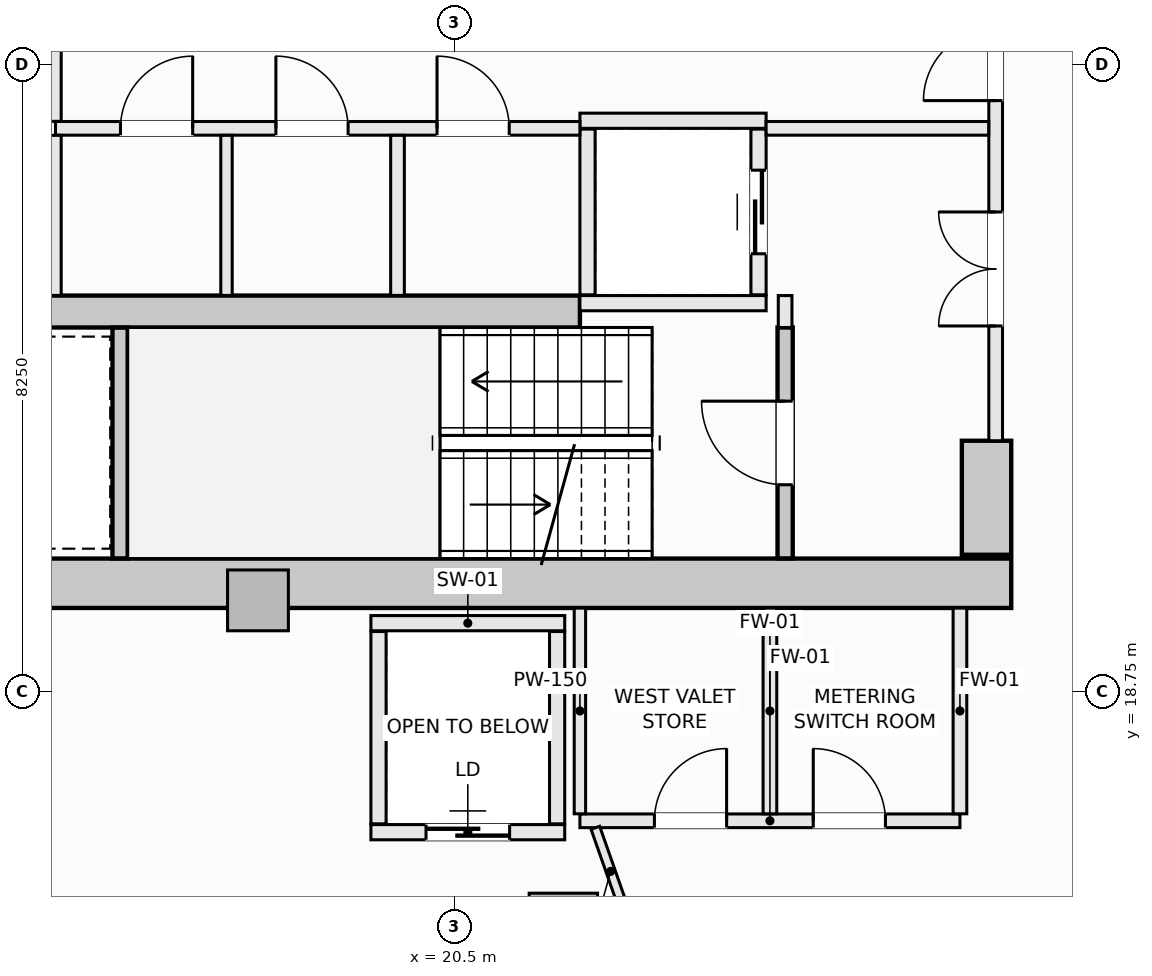
"""IFC4 building model, lengths in metres.
Left out: names, types, materials, properties, quantities, classifications, styles, units other than length and angle.
Written with IfcOpenShell. Run it as: python <this file> out.ifc"""

import sys

from ifc_helpers import new_model, si_unit, direction, frame, frame_2d, origin, origin_2d, place, context, subcontext, project, spatial, rectangle, extrude, element, fill, save


model = new_model("IFC4")
c1 = context("Model", 3, precision=1e-05, world=origin(), true_north=direction((0.0, 1.0)))
c2 = subcontext(c1, "Body", "Model", "MODEL_VIEW")
j1 = project(units=[si_unit("LENGTHUNIT", "METRE"), si_unit("PLANEANGLEUNIT", "RADIAN")], contexts=[c1])
p1 = place(None, origin())
s1 = spatial("IfcSite", under=j1, at=p1, CompositionType="ELEMENT")
p2 = place(p1, origin())
s2 = spatial("IfcBuilding", under=s1, at=p2, CompositionType="ELEMENT")
p3 = place(p2, frame((0.0, 0.0, 135.9)))
s3 = spatial("IfcBuildingStorey", under=s2, at=p3, CompositionType="ELEMENT", Elevation=135.9)
p4 = place(p3, frame((14.175, 20.175, -0.27), z_axis=(0.0, 0.0, 1.0), x_axis=(1.0, 0.0, 0.0)))
e1 = element("IfcWall", 1, at=p4, inside=s3, PredefinedType="SHEAR", context=c2, shape_type="SweptSolid", body=[
    extrude(rectangle(XDim=13.65, YDim=0.65, at=frame_2d((6.825, 0.0))), origin(), (0.0, 0.0, 1.0), 3.4),
])
p5 = place(p3, frame((27.5, 20.55, -0.27), z_axis=(0.0, 0.0, 1.0), x_axis=(0.0, 1.0, 0.0)))
e2 = element("IfcWall", 2, at=p5, inside=s3, PredefinedType="SHEAR", context=c2, shape_type="SweptSolid", body=[
    extrude(rectangle(XDim=1.5, YDim=0.65, at=frame_2d((0.75, 0.0))), origin(), (0.0, 0.0, 1.0), 3.4),
])
p6 = place(p3, frame((14.85, 23.75, -0.27), z_axis=(0.0, 0.0, 1.0), x_axis=(1.0, 0.0, 0.0)))
e3 = element("IfcWall", 3, at=p6, inside=s3, PredefinedType="SHEAR", context=c2, shape_type="SweptSolid", body=[
    extrude(rectangle(XDim=7.3, YDim=0.42, at=frame_2d((3.65, 0.0))), origin(), (0.0, 0.0, 1.0), 3.4),
])
p7 = place(p3, frame((21.932, 15.648, -0.27), z_axis=(0.0, 0.0, 1.0), x_axis=(1.0, 0.0, 0.0)))
e4 = element("IfcColumn", 4, at=p7, inside=s3, PredefinedType="COLUMN", context=c2, shape_type="SweptSolid", body=[
    extrude(rectangle(XDim=0.9, YDim=0.9, at=origin_2d()), origin(), (0.0, 0.0, 1.0), 3.4),
])
p8 = place(p3, frame((17.914, 19.95, -0.27), z_axis=(0.0, 0.0, 1.0), x_axis=(1.0, 0.0, 0.0)))
e5 = element("IfcColumn", 5, at=p8, inside=s3, PredefinedType="PILASTER", context=c2, shape_type="SweptSolid", body=[
    extrude(rectangle(XDim=0.8, YDim=0.8, at=origin_2d()), origin(), (0.0, 0.0, 1.0), 3.4),
])
p9 = place(p3, frame((24.85, 20.502, -0.27), z_axis=(0.0, 0.0, 1.0), x_axis=(0.0, 1.0, 0.0)))
e6 = element("IfcWall", 6, at=p9, inside=s3, PredefinedType="SHEAR", context=c2, shape_type="SweptSolid", body=[
    extrude(rectangle(XDim=3.038, YDim=0.2, at=frame_2d((1.519, 0.0))), origin(), (0.0, 0.0, 1.0), 3.4),
])
p10 = place(p9, frame((0.969, 0.0, 0.27)))
e7 = element("IfcOpeningElement", 7, at=p10, cuts=e6, PredefinedType="OPENING", context=c2, shape_type="SweptSolid", body=[
    extrude(rectangle(XDim=1.1, YDim=2.15, at=frame_2d((0.55, 1.075))), frame((0.0, 0.11, 0.0), z_axis=(0.0, -1.0, 0.0), x_axis=(1.0, 0.0, 0.0)), (0.0, 0.0, 1.0), 0.22),
])
p11 = place(p3, frame((16.1, 20.502, -0.27), z_axis=(0.0, 0.0, 1.0), x_axis=(0.0, 1.0, 0.0)))
e8 = element("IfcWall", 8, at=p11, inside=s3, PredefinedType="SHEAR", context=c2, shape_type="SweptSolid", body=[
    extrude(rectangle(XDim=3.036, YDim=0.2, at=frame_2d((1.518, 0.0))), origin(), (0.0, 0.0, 1.0), 3.4),
])
for number, where, z_axis, x_axis in (
    (9, (22.15, 26.26, 0.0), (0.0, 0.0, 1.0), (1.0, 0.0, 0.0)),
    (10, (22.15, 23.86, 0.0), (0.0, 0.0, 1.0), (1.0, 0.0, 0.0)),
):
    element("IfcWall", number, at=place(p3, frame(where, z_axis=z_axis, x_axis=x_axis)), inside=s3, PredefinedType="SOLIDWALL", context=c2, shape_type="SweptSolid", body=[
        extrude(rectangle(XDim=2.45, YDim=0.2, at=frame_2d((1.225, 0.0))), origin(), (0.0, 0.0, 1.0), 3.13),
    ])
p12 = place(p3, frame((22.25, 23.97, 0.0), z_axis=(0.0, 0.0, 1.0), x_axis=(0.0, 1.0, 0.0)))
e11 = element("IfcWall", 11, at=p12, inside=s3, PredefinedType="SOLIDWALL", context=c2, shape_type="SweptSolid", body=[
    extrude(rectangle(XDim=2.18, YDim=0.2, at=frame_2d((1.09, 0.0))), origin(), (0.0, 0.0, 1.0), 3.13),
])
p13 = place(p3, frame((24.5, 23.97, 0.0), z_axis=(0.0, 0.0, 1.0), x_axis=(0.0, 1.0, 0.0)))
e12 = element("IfcWall", 12, at=p13, inside=s3, PredefinedType="SOLIDWALL", context=c2, shape_type="SweptSolid", body=[
    extrude(rectangle(XDim=2.18, YDim=0.2, at=frame_2d((1.09, 0.0))), origin(), (0.0, 0.0, 1.0), 3.13),
])
p14 = place(p13, frame((0.54, 0.0, 0.0)))
e13 = element("IfcOpeningElement", 13, at=p14, cuts=e12, PredefinedType="OPENING", context=c2, shape_type="SweptSolid", body=[
    extrude(rectangle(XDim=1.1, YDim=2.2, at=frame_2d((0.55, 1.1))), frame((0.0, 0.11, 0.0), z_axis=(0.0, -1.0, 0.0), x_axis=(1.0, 0.0, 0.0)), (0.0, 0.0, 1.0), 0.22),
])
p15 = place(p3, frame((19.4, 19.65, 0.0), z_axis=(0.0, 0.0, 1.0), x_axis=(1.0, 0.0, 0.0)))
e14 = element("IfcWall", 14, at=p15, inside=s3, PredefinedType="SOLIDWALL", context=c2, shape_type="SweptSolid", body=[
    extrude(rectangle(XDim=2.55, YDim=0.2, at=frame_2d((1.275, 0.0))), origin(), (0.0, 0.0, 1.0), 3.13),
])
p16 = place(p3, frame((19.4, 16.9, 0.0), z_axis=(0.0, 0.0, 1.0), x_axis=(1.0, 0.0, 0.0)))
e15 = element("IfcWall", 15, at=p16, inside=s3, PredefinedType="SOLIDWALL", context=c2, shape_type="SweptSolid", body=[
    extrude(rectangle(XDim=2.55, YDim=0.2, at=frame_2d((1.275, 0.0))), origin(), (0.0, 0.0, 1.0), 3.13),
])
p17 = place(p16, frame((0.725, 0.0, 0.0)))
e16 = element("IfcOpeningElement", 16, at=p17, cuts=e15, PredefinedType="OPENING", context=c2, shape_type="SweptSolid", body=[
    extrude(rectangle(XDim=1.1, YDim=2.2, at=frame_2d((0.55, 1.1))), frame((0.0, 0.11, 0.0), z_axis=(0.0, -1.0, 0.0), x_axis=(1.0, 0.0, 0.0)), (0.0, 0.0, 1.0), 0.22),
])
for number, where, z_axis, x_axis in (
    (17, (19.5, 17.01, 0.0), (0.0, 0.0, 1.0), (0.0, 1.0, 0.0)),
    (18, (21.85, 17.01, 0.0), (0.0, 0.0, 1.0), (0.0, 1.0, 0.0)),
):
    element("IfcWall", number, at=place(p3, frame(where, z_axis=z_axis, x_axis=x_axis)), inside=s3, PredefinedType="SOLIDWALL", context=c2, shape_type="SweptSolid", body=[
        extrude(rectangle(XDim=2.53, YDim=0.2, at=frame_2d((1.265, 0.0))), origin(), (0.0, 0.0, 1.0), 3.13),
    ])
p18 = place(p3, frame((24.85, 23.54, 0.0), z_axis=(0.0, 0.0, 1.0), x_axis=(0.0, 1.0, 0.0)))
e19 = element("IfcWall", 19, at=p18, inside=s3, PredefinedType="SOLIDWALL", context=c2, shape_type="SweptSolid", body=[
    extrude(rectangle(XDim=0.42, YDim=0.18, at=frame_2d((0.21, 0.0))), origin(), (0.0, 0.0, 1.0), 3.13),
])
p19 = place(p3, frame((27.62, 22.05, 0.0), z_axis=(0.0, 0.0, 1.0), x_axis=(0.0, 1.0, 0.0)))
e20 = element("IfcWall", 20, at=p19, inside=s3, PredefinedType="SOLIDWALL", context=c2, shape_type="SweptSolid", body=[
    extrude(rectangle(XDim=9.9, YDim=0.18, at=frame_2d((4.95, 0.0))), origin(), (0.0, 0.0, 1.0), 3.13),
])
p20 = place(p19, frame((4.475, 0.0, 0.0)))
e21 = element("IfcOpeningElement", 21, at=p20, cuts=e20, PredefinedType="OPENING", context=c2, shape_type="SweptSolid", body=[
    extrude(rectangle(XDim=0.95, YDim=2.1, at=frame_2d((0.475, 1.05))), frame((0.0, 0.1, 0.0), z_axis=(0.0, -1.0, 0.0), x_axis=(1.0, 0.0, 0.0)), (0.0, 0.0, 1.0), 0.2),
])
p21 = place(p19, frame((6.89, 0.0, 0.0)))
e22 = element("IfcOpeningElement", 22, at=p21, cuts=e20, PredefinedType="OPENING", context=c2, shape_type="SweptSolid", body=[
    extrude(rectangle(XDim=1.5, YDim=2.2, at=frame_2d((0.75, 1.1))), frame((0.0, 0.1, 0.0), z_axis=(0.0, -1.0, 0.0), x_axis=(1.0, 0.0, 0.0)), (0.0, 0.0, 1.0), 0.2),
])
p22 = place(p19, frame((1.51, 0.0, 0.0)))
e23 = element("IfcOpeningElement", 23, at=p22, cuts=e20, PredefinedType="OPENING", context=c2, shape_type="SweptSolid", body=[
    extrude(rectangle(XDim=1.5, YDim=2.2, at=frame_2d((0.75, 1.1))), frame((0.0, 0.1, 0.0), z_axis=(0.0, -1.0, 0.0), x_axis=(1.0, 0.0, 0.0)), (0.0, 0.0, 1.0), 0.2),
])
p23 = place(p3, frame((15.25, 26.16, 0.0), z_axis=(0.0, 0.0, 1.0), x_axis=(1.0, 0.0, 0.0)))
e24 = element("IfcWall", 24, at=p23, inside=s3, PredefinedType="SOLIDWALL", context=c2, shape_type="SweptSolid", body=[
    extrude(rectangle(XDim=6.9, YDim=0.18, at=frame_2d((3.45, 0.0))), origin(), (0.0, 0.0, 1.0), 3.13),
])
p24 = place(p23, frame((5.02, 0.0, 0.0)))
e25 = element("IfcOpeningElement", 25, at=p24, cuts=e24, PredefinedType="OPENING", context=c2, shape_type="SweptSolid", body=[
    extrude(rectangle(XDim=0.95, YDim=2.1, at=frame_2d((0.475, 1.05))), frame((0.0, 0.1, 0.0), z_axis=(0.0, -1.0, 0.0), x_axis=(1.0, 0.0, 0.0)), (0.0, 0.0, 1.0), 0.2),
])
p25 = place(p23, frame((0.855, 0.0, 0.0)))
e26 = element("IfcOpeningElement", 26, at=p25, cuts=e24, PredefinedType="OPENING", context=c2, shape_type="SweptSolid", body=[
    extrude(rectangle(XDim=0.95, YDim=2.1, at=frame_2d((0.475, 1.05))), frame((0.0, 0.1, 0.0), z_axis=(0.0, -1.0, 0.0), x_axis=(1.0, 0.0, 0.0)), (0.0, 0.0, 1.0), 0.2),
])
p26 = place(p23, frame((2.9, 0.0, 0.0)))
e27 = element("IfcOpeningElement", 27, at=p26, cuts=e24, PredefinedType="OPENING", context=c2, shape_type="SweptSolid", body=[
    extrude(rectangle(XDim=0.95, YDim=2.1, at=frame_2d((0.475, 1.05))), frame((0.0, 0.1, 0.0), z_axis=(0.0, -1.0, 0.0), x_axis=(1.0, 0.0, 0.0)), (0.0, 0.0, 1.0), 0.2),
])
p27 = place(p3, frame((24.6, 26.16, 0.0), z_axis=(0.0, 0.0, 1.0), x_axis=(1.0, 0.0, 0.0)))
e28 = element("IfcWall", 28, at=p27, inside=s3, PredefinedType="SOLIDWALL", context=c2, shape_type="SweptSolid", body=[
    extrude(rectangle(XDim=2.928, YDim=0.18, at=frame_2d((1.464, 0.0))), origin(), (0.0, 0.0, 1.0), 3.13),
])
p28 = place(p3, frame((15.25, 23.962, 0.0), z_axis=(0.0, 0.0, 1.0), x_axis=(0.0, 1.0, 0.0)))
e29 = element("IfcWall", 29, at=p28, inside=s3, PredefinedType="PARTITIONING", context=c2, shape_type="SweptSolid", body=[
    extrude(rectangle(XDim=2.106, YDim=0.15, at=frame_2d((1.053, 0.0))), origin(), (0.0, 0.0, 1.0), 3.13),
])
p29 = place(p3, frame((15.25, 26.252, 0.0), z_axis=(0.0, 0.0, 1.0), x_axis=(0.0, 1.0, 0.0)))
e30 = element("IfcWall", 30, at=p29, inside=s3, PredefinedType="PARTITIONING", context=c2, shape_type="SweptSolid", body=[
    extrude(rectangle(XDim=1.496, YDim=0.15, at=frame_2d((0.748, 0.0))), origin(), (0.0, 0.0, 1.0), 3.13),
])
p30 = place(p3, frame((19.75, 23.962, 0.0), z_axis=(0.0, 0.0, 1.0), x_axis=(0.0, 1.0, 0.0)))
e31 = element("IfcWall", 31, at=p30, inside=s3, PredefinedType="SOLIDWALL", context=c2, shape_type="SweptSolid", body=[
    extrude(rectangle(XDim=2.106, YDim=0.18, at=frame_2d((1.053, 0.0))), origin(), (0.0, 0.0, 1.0), 3.13),
])
p31 = place(p3, frame((17.5, 23.962, 0.0), z_axis=(0.0, 0.0, 1.0), x_axis=(0.0, 1.0, 0.0)))
e32 = element("IfcWall", 32, at=p31, inside=s3, PredefinedType="PARTITIONING", context=c2, shape_type="SweptSolid", body=[
    extrude(rectangle(XDim=2.106, YDim=0.15, at=frame_2d((1.053, 0.0))), origin(), (0.0, 0.0, 1.0), 3.13),
])
p32 = place(p3, frame((22.15, 17.05, 0.0), z_axis=(0.0, 0.0, 1.0), x_axis=(1.0, 0.0, 0.0)))
e33 = element("IfcWall", 33, at=p32, inside=s3, PredefinedType="SOLIDWALL", context=c2, shape_type="SweptSolid", body=[
    extrude(rectangle(XDim=5.0, YDim=0.18, at=frame_2d((2.5, 0.0))), origin(), (0.0, 0.0, 1.0), 3.13),
])
p33 = place(p32, frame((0.98, 0.0, 0.0)))
e34 = element("IfcOpeningElement", 34, at=p33, cuts=e33, PredefinedType="OPENING", context=c2, shape_type="SweptSolid", body=[
    extrude(rectangle(XDim=0.95, YDim=2.1, at=frame_2d((0.475, 1.05))), frame((0.0, 0.1, 0.0), z_axis=(0.0, -1.0, 0.0), x_axis=(1.0, 0.0, 0.0)), (0.0, 0.0, 1.0), 0.2),
])
p34 = place(p32, frame((3.07, 0.0, 0.0)))
e35 = element("IfcOpeningElement", 35, at=p34, cuts=e33, PredefinedType="OPENING", context=c2, shape_type="SweptSolid", body=[
    extrude(rectangle(XDim=0.95, YDim=2.1, at=frame_2d((0.475, 1.05))), frame((0.0, 0.1, 0.0), z_axis=(0.0, -1.0, 0.0), x_axis=(1.0, 0.0, 0.0)), (0.0, 0.0, 1.0), 0.2),
])
p35 = place(p3, frame((22.15, 17.142, 0.0), z_axis=(0.0, 0.0, 1.0), x_axis=(0.0, 1.0, 0.0)))
e36 = element("IfcWall", 36, at=p35, inside=s3, PredefinedType="PARTITIONING", context=c2, shape_type="SweptSolid", body=[
    extrude(rectangle(XDim=2.706, YDim=0.15, at=frame_2d((1.353, 0.0))), origin(), (0.0, 0.0, 1.0), 3.13),
])
for number, where, z_axis, x_axis in (
    (37, (24.65, 17.142, 0.0), (0.0, 0.0, 1.0), (0.0, 1.0, 0.0)),
    (38, (27.15, 17.142, 0.0), (0.0, 0.0, 1.0), (0.0, 1.0, 0.0)),
):
    element("IfcWall", number, at=place(p3, frame(where, z_axis=z_axis, x_axis=x_axis)), inside=s3, PredefinedType="SOLIDWALL", context=c2, shape_type="SweptSolid", body=[
        extrude(rectangle(XDim=2.706, YDim=0.18, at=frame_2d((1.353, 0.0))), origin(), (0.0, 0.0, 1.0), 3.13),
    ])
p36 = place(p3, frame((22.353, 16.958, 0.0), z_axis=(0.0, 0.0, 1.0), x_axis=(0.331370038458, -0.943500873138, 0.0)))
e39 = element("IfcWall", 39, at=p36, inside=s3, PredefinedType="PARTITIONING", context=c2, shape_type="SweptSolid", body=[
    extrude(rectangle(XDim=1.216, YDim=0.12, at=frame_2d((0.608, 0.0))), origin(), (0.0, 0.0, 1.0), 3.13),
])
p37 = place(p10, origin())
e40 = element("IfcDoor", 40, at=p37, inside=s3, OperationType="SINGLE_SWING_RIGHT", PredefinedType="DOOR", context=c2, shape_type="SweptSolid", body=[
    extrude(rectangle(XDim=1.1, YDim=2.15, at=frame_2d((0.55, 1.075))), frame((0.0, 0.025, 0.0), z_axis=(0.0, -1.0, 0.0), x_axis=(1.0, 0.0, 0.0)), (0.0, 0.0, 1.0), 0.05),
])
fill(e7, e40)
p38 = place(p14, origin())
e41 = element("IfcDoor", 41, at=p38, inside=s3, OperationType="SLIDING_TO_LEFT", PredefinedType="DOOR", context=c2, shape_type="SweptSolid", body=[
    extrude(rectangle(XDim=1.1, YDim=2.2, at=frame_2d((0.55, 1.1))), frame((0.0, 0.025, 0.0), z_axis=(0.0, -1.0, 0.0), x_axis=(1.0, 0.0, 0.0)), (0.0, 0.0, 1.0), 0.05),
])
fill(e13, e41)
p39 = place(p17, origin())
e42 = element("IfcDoor", 42, at=p39, inside=s3, OperationType="SLIDING_TO_LEFT", PredefinedType="DOOR", context=c2, shape_type="SweptSolid", body=[
    extrude(rectangle(XDim=1.1, YDim=2.2, at=frame_2d((0.55, 1.1))), frame((0.0, 0.025, 0.0), z_axis=(0.0, -1.0, 0.0), x_axis=(1.0, 0.0, 0.0)), (0.0, 0.0, 1.0), 0.05),
])
fill(e16, e42)
p40 = place(p20, origin())
e43 = element("IfcDoor", 43, at=p40, inside=s3, OperationType="SINGLE_SWING_LEFT", PredefinedType="DOOR", context=c2, shape_type="SweptSolid", body=[
    extrude(rectangle(XDim=0.95, YDim=2.1, at=frame_2d((0.475, 1.05))), frame((0.0, 0.025, 0.0), z_axis=(0.0, -1.0, 0.0), x_axis=(1.0, 0.0, 0.0)), (0.0, 0.0, 1.0), 0.05),
])
fill(e21, e43)
p41 = place(p22, origin())
e44 = element("IfcDoor", 44, at=p41, inside=s3, OperationType="DOUBLE_DOOR_SINGLE_SWING", PredefinedType="DOOR", context=c2, shape_type="SweptSolid", body=[
    extrude(rectangle(XDim=1.5, YDim=2.2, at=frame_2d((0.75, 1.1))), frame((0.0, 0.025, 0.0), z_axis=(0.0, -1.0, 0.0), x_axis=(1.0, 0.0, 0.0)), (0.0, 0.0, 1.0), 0.05),
])
fill(e23, e44)
p42 = place(p24, origin())
e45 = element("IfcDoor", 45, at=p42, inside=s3, OperationType="SINGLE_SWING_LEFT", PredefinedType="DOOR", context=c2, shape_type="SweptSolid", body=[
    extrude(rectangle(XDim=0.95, YDim=2.1, at=frame_2d((0.475, 1.05))), frame((0.0, 0.025, 0.0), z_axis=(0.0, -1.0, 0.0), x_axis=(1.0, 0.0, 0.0)), (0.0, 0.0, 1.0), 0.05),
])
fill(e25, e45)
p43 = place(p25, origin())
e46 = element("IfcDoor", 46, at=p43, inside=s3, OperationType="SINGLE_SWING_RIGHT", PredefinedType="DOOR", context=c2, shape_type="SweptSolid", body=[
    extrude(rectangle(XDim=0.95, YDim=2.1, at=frame_2d((0.475, 1.05))), frame((0.0, 0.025, 0.0), z_axis=(0.0, -1.0, 0.0), x_axis=(1.0, 0.0, 0.0)), (0.0, 0.0, 1.0), 0.05),
])
fill(e26, e46)
p44 = place(p26, origin())
e47 = element("IfcDoor", 47, at=p44, inside=s3, OperationType="SINGLE_SWING_LEFT", PredefinedType="DOOR", context=c2, shape_type="SweptSolid", body=[
    extrude(rectangle(XDim=0.95, YDim=2.1, at=frame_2d((0.475, 1.05))), frame((0.0, 0.025, 0.0), z_axis=(0.0, -1.0, 0.0), x_axis=(1.0, 0.0, 0.0)), (0.0, 0.0, 1.0), 0.05),
])
fill(e27, e47)
p45 = place(p33, origin())
e48 = element("IfcDoor", 48, at=p45, inside=s3, OperationType="SINGLE_SWING_RIGHT", PredefinedType="DOOR", context=c2, shape_type="SweptSolid", body=[
    extrude(rectangle(XDim=0.95, YDim=2.1, at=frame_2d((0.475, 1.05))), frame((0.0, 0.025, 0.0), z_axis=(0.0, -1.0, 0.0), x_axis=(1.0, 0.0, 0.0)), (0.0, 0.0, 1.0), 0.05),
])
fill(e34, e48)
p46 = place(p34, origin())
e49 = element("IfcDoor", 49, at=p46, inside=s3, OperationType="SINGLE_SWING_LEFT", PredefinedType="DOOR", context=c2, shape_type="SweptSolid", body=[
    extrude(rectangle(XDim=0.95, YDim=2.1, at=frame_2d((0.475, 1.05))), frame((0.0, 0.025, 0.0), z_axis=(0.0, -1.0, 0.0), x_axis=(1.0, 0.0, 0.0)), (0.0, 0.0, 1.0), 0.05),
])
fill(e35, e49)
save(model, sys.argv[1])
